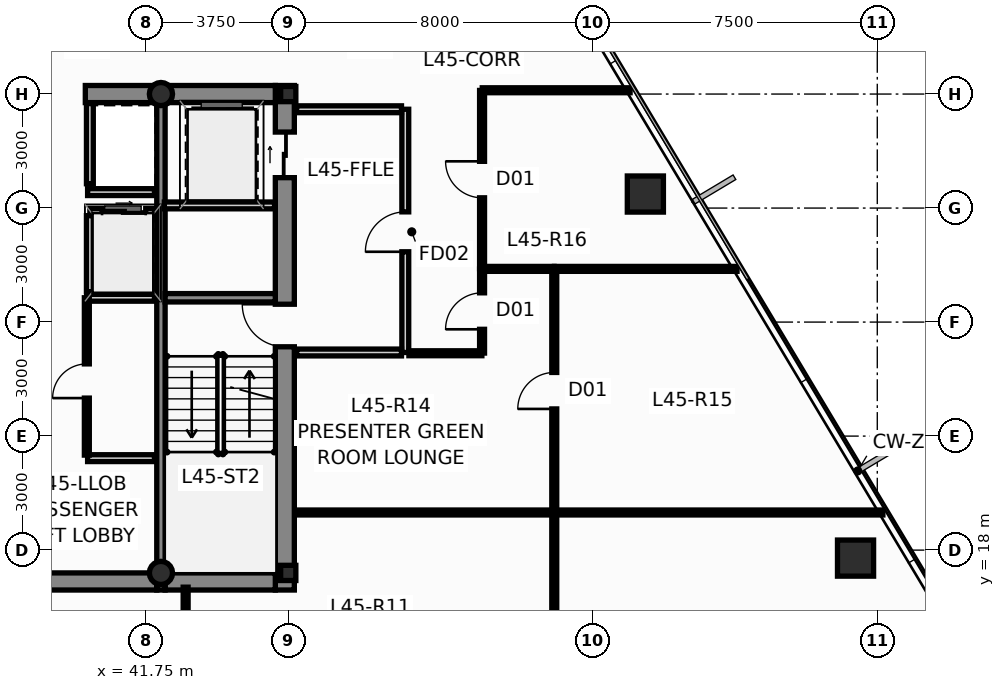
"""IFC4 building model, lengths in metres.
Left out: names, types, materials, properties, quantities, classifications, styles, units other than length and angle.
Written with IfcOpenShell. Run it as: python <this file> out.ifc"""

import sys

from ifc_helpers import new_model, si_unit, direction, frame, frame_2d, origin, origin_2d, place, context, subcontext, project, spatial, rectangle, hollow_rectangle, hollow_circle, i_section, extrude, source, transform, mapped, element, fill, save


model = new_model("IFC4")
c1 = context("Model", 3, precision=1e-05, world=origin(), true_north=direction((0.0, 1.0)))
c2 = subcontext(c1, "Body", "Model", "MODEL_VIEW")
j1 = project(units=[si_unit("LENGTHUNIT", "METRE"), si_unit("PLANEANGLEUNIT", "RADIAN")], contexts=[c1])
p1 = place(None, origin())
s1 = spatial("IfcSite", under=j1, at=p1, CompositionType="ELEMENT")
p2 = place(p1, origin())
s2 = spatial("IfcBuilding", under=s1, at=p2, CompositionType="ELEMENT")
p3 = place(p2, frame((0.0, 0.0, 173.1)))
s3 = spatial("IfcBuildingStorey", under=s2, at=p3, CompositionType="ELEMENT", Elevation=173.1)
m1 = source(origin(), c2, "Body", "SweptSolid", [
    extrude(i_section(OverallWidth=0.4, OverallDepth=0.4, WebThickness=0.02, FlangeThickness=0.032, at=origin_2d()), origin(), (0.0, 0.0, 1.0), 3.65),
])
for number, where, z_axis, x_axis in (
    (1, (45.5, 17.4, 0.0), (0.0, 0.0, 1.0), (1.0, 0.0, 0.0)),
    (2, (45.5, 30.0, 0.0), (0.0, 0.0, 1.0), (1.0, 0.0, 0.0)),
):
    element("IfcColumn", number, at=place(p3, frame(where, z_axis=z_axis, x_axis=x_axis)), inside=s3, PredefinedType="COLUMN", context=c2, shape_type="MappedRepresentation", body=[
        mapped(m1, transform((0.0, 0.0, 0.0), scale=1.0)),
    ])
m2 = source(origin(), c2, "Body", "SweptSolid", [
    extrude(hollow_circle(Radius=0.305, WallThickness=0.025, at=origin_2d()), origin(), (0.0, 0.0, 1.0), 3.65),
])
for number, where, z_axis, x_axis in (
    (3, (42.15, 17.4, 0.0), (0.0, 0.0, 1.0), (1.0, 0.0, 0.0)),
    (4, (42.15, 30.0, 0.0), (0.0, 0.0, 1.0), (1.0, 0.0, 0.0)),
):
    element("IfcColumn", number, at=place(p3, frame(where, z_axis=z_axis, x_axis=x_axis)), inside=s3, PredefinedType="COLUMN", context=c2, shape_type="MappedRepresentation", body=[
        mapped(m2, transform((0.0, 0.0, 0.0), scale=1.0)),
    ])
p4 = place(p3, frame((45.41, 16.95, 0.0), z_axis=(0.0, 0.0, 1.0), x_axis=(0.0, 1.0, 0.0)))
e5 = element("IfcWall", 5, at=p4, inside=s3, PredefinedType="SHEAR", context=c2, shape_type="SweptSolid", body=[
    extrude(rectangle(XDim=13.275, YDim=0.5, at=frame_2d((6.638, 0.0))), origin(), (0.0, 0.0, 1.0), 3.65),
])
p5 = place(p4, frame((6.4, 0.0, 0.0)))
e6 = element("IfcOpeningElement", 6, at=p5, cuts=e5, PredefinedType="OPENING", context=c2, shape_type="SweptSolid", body=[
    extrude(rectangle(XDim=1.12, YDim=2.15, at=frame_2d((0.56, 1.075))), frame((0.0, 0.262, 0.0), z_axis=(0.0, -1.0, 0.0), x_axis=(1.0, 0.0, 0.0)), (0.0, 0.0, 1.0), 0.524),
])
p6 = place(p4, frame((10.85, 0.0, 0.0)))
e7 = element("IfcOpeningElement", 7, at=p6, cuts=e5, PredefinedType="OPENING", context=c2, shape_type="SweptSolid", body=[
    extrude(rectangle(XDim=1.2, YDim=2.2, at=frame_2d((0.6, 1.1))), frame((0.0, 0.262, 0.0), z_axis=(0.0, -1.0, 0.0), x_axis=(1.0, 0.0, 0.0)), (0.0, 0.0, 1.0), 0.524),
])
p7 = place(p3, frame((33.96, 17.175, 0.0), z_axis=(0.0, 0.0, 1.0), x_axis=(1.0, 0.0, 0.0)))
e8 = element("IfcWall", 8, at=p7, inside=s3, PredefinedType="SHEAR", context=c2, shape_type="SweptSolid", body=[
    extrude(rectangle(XDim=8.08, YDim=0.45, at=frame_2d((4.04, 0.0))), origin(), (0.0, 0.0, 1.0), 3.65),
])
p8 = place(p3, frame((42.26, 17.175, 0.0), z_axis=(0.0, 0.0, 1.0), x_axis=(1.0, 0.0, 0.0)))
e9 = element("IfcWall", 9, at=p8, inside=s3, PredefinedType="SHEAR", context=c2, shape_type="SweptSolid", body=[
    extrude(rectangle(XDim=2.9, YDim=0.45, at=frame_2d((1.45, 0.0))), origin(), (0.0, 0.0, 1.0), 3.65),
])
p9 = place(p3, frame((40.16, 30.0, 0.0), z_axis=(0.0, 0.0, 1.0), x_axis=(1.0, 0.0, 0.0)))
e10 = element("IfcWall", 10, at=p9, inside=s3, PredefinedType="SHEAR", context=c2, shape_type="SweptSolid", body=[
    extrude(rectangle(XDim=1.88, YDim=0.45, at=frame_2d((0.94, 0.0))), origin(), (0.0, 0.0, 1.0), 3.65),
])
p10 = place(p3, frame((42.26, 30.0, 0.0), z_axis=(0.0, 0.0, 1.0), x_axis=(1.0, 0.0, 0.0)))
e11 = element("IfcWall", 11, at=p10, inside=s3, PredefinedType="SHEAR", context=c2, shape_type="SweptSolid", body=[
    extrude(rectangle(XDim=2.9, YDim=0.45, at=frame_2d((1.45, 0.0))), origin(), (0.0, 0.0, 1.0), 3.65),
])
p11 = place(p3, frame((42.15, 16.95, 0.0), z_axis=(0.0, 0.0, 1.0), x_axis=(0.0, 1.0, 0.0)))
e12 = element("IfcWall", 12, at=p11, inside=s3, PredefinedType="SHEAR", context=c2, shape_type="SweptSolid", body=[
    extrude(rectangle(XDim=13.275, YDim=0.22, at=frame_2d((6.638, 0.0))), origin(), (0.0, 0.0, 1.0), 3.65),
])
p12 = place(p3, frame((42.26, 24.64, 0.0), z_axis=(0.0, 0.0, 1.0), x_axis=(1.0, 0.0, 0.0)))
e13 = element("IfcWall", 13, at=p12, inside=s3, PredefinedType="SHEAR", context=c2, shape_type="SweptSolid", body=[
    extrude(rectangle(XDim=2.9, YDim=0.22, at=frame_2d((1.45, 0.0))), origin(), (0.0, 0.0, 1.0), 3.65),
])
m3 = source(origin(), c2, "Body", "SweptSolid", [
    extrude(hollow_rectangle(XDim=0.95, YDim=0.95, WallThickness=0.05, at=origin_2d()), origin(), (0.0, 0.0, 1.0), 3.651),
])
p13 = place(p3, frame((60.428, 17.79, 0.0), z_axis=(-0.010364917199, -0.021599150033, 0.999712981415), x_axis=(0.901566609123, -0.432640323264, 0.0)))
e14 = element("IfcColumn", 14, at=p13, inside=s3, PredefinedType="COLUMN", context=c2, shape_type="MappedRepresentation", body=[
    mapped(m3, transform((0.0, 0.0, 0.0), scale=1.0)),
])
m4 = source(origin(), c2, "Body", "SweptSolid", [
    extrude(hollow_rectangle(XDim=0.95, YDim=0.95, WallThickness=0.05, at=origin_2d()), origin(), (0.0, 0.0, 1.0), 3.651),
])
p14 = place(p3, frame((54.897, 27.369, 0.0), z_axis=(-0.014913313399, -0.013776424037, 0.999793880369), x_axis=(0.678553674548, -0.734550822447, 0.0)))
e15 = element("IfcColumn", 15, at=p14, inside=s3, PredefinedType="COLUMN", context=c2, shape_type="MappedRepresentation", body=[
    mapped(m4, transform((0.0, 0.0, 0.0), scale=1.0)),
])
p15 = place(p3, frame((40.28, 26.9, 0.0), z_axis=(0.0, 0.0, 1.0), x_axis=(1.0, 0.0, 0.0)))
e16 = element("IfcWall", 16, at=p15, inside=s3, PredefinedType="PARTITIONING", context=c2, shape_type="SweptSolid", body=[
    extrude(rectangle(XDim=1.7, YDim=0.18, at=frame_2d((0.85, 0.0))), origin(), (0.0, 0.0, 1.0), 3.4),
])
p16 = place(p15, frame((0.32, 0.0, 0.0)))
e17 = element("IfcOpeningElement", 17, at=p16, cuts=e16, PredefinedType="OPENING", context=c2, shape_type="SweptSolid", body=[
    extrude(rectangle(XDim=1.15, YDim=2.2, at=frame_2d((0.575, 1.1))), frame((0.0, 0.102, 0.0), z_axis=(0.0, -1.0, 0.0), x_axis=(1.0, 0.0, 0.0)), (0.0, 0.0, 1.0), 0.204),
])
p17 = place(p3, frame((40.28, 24.8, 0.0), z_axis=(0.0, 0.0, 1.0), x_axis=(0.0, 1.0, 0.0)))
e18 = element("IfcWall", 18, at=p17, inside=s3, PredefinedType="PARTITIONING", context=c2, shape_type="SweptSolid", body=[
    extrude(rectangle(XDim=2.0, YDim=0.18, at=frame_2d((1.0, 0.0))), origin(), (0.0, 0.0, 1.0), 3.4),
])
p18 = place(p3, frame((40.2, 24.64, 0.0), z_axis=(0.0, 0.0, 1.0), x_axis=(1.0, 0.0, 0.0)))
e19 = element("IfcWall", 19, at=p18, inside=s3, PredefinedType="PARTITIONING", context=c2, shape_type="SweptSolid", body=[
    extrude(rectangle(XDim=1.78, YDim=0.18, at=frame_2d((0.89, 0.0))), origin(), (0.0, 0.0, 1.0), 3.4),
])
p19 = place(p3, frame((40.22, 27.42, 0.0), z_axis=(0.0, 0.0, 1.0), x_axis=(1.0, 0.0, 0.0)))
e20 = element("IfcWall", 20, at=p19, inside=s3, PredefinedType="PARTITIONING", context=c2, shape_type="SweptSolid", body=[
    extrude(rectangle(XDim=1.76, YDim=0.18, at=frame_2d((0.88, 0.0))), origin(), (0.0, 0.0, 1.0), 3.4),
])
p20 = place(p3, frame((40.28, 27.64, 0.0), z_axis=(0.0, 0.0, 1.0), x_axis=(0.0, 1.0, 0.0)))
e21 = element("IfcWall", 21, at=p20, inside=s3, PredefinedType="PARTITIONING", context=c2, shape_type="SweptSolid", body=[
    extrude(rectangle(XDim=2.11, YDim=0.18, at=frame_2d((1.055, 0.0))), origin(), (0.0, 0.0, 1.0), 3.4),
])
p21 = place(p3, frame((48.58, 23.2, 0.0), z_axis=(0.0, 0.0, 1.0), x_axis=(0.0, 1.0, 0.0)))
e22 = element("IfcWall", 22, at=p21, inside=s3, PredefinedType="PARTITIONING", context=c2, shape_type="SweptSolid", body=[
    extrude(rectangle(XDim=6.4, YDim=0.18, at=frame_2d((3.2, 0.0))), origin(), (0.0, 0.0, 1.0), 3.078),
])
p22 = place(p21, frame((2.65, 0.0, 0.0)))
e23 = element("IfcOpeningElement", 23, at=p22, cuts=e22, PredefinedType="OPENING", context=c2, shape_type="SweptSolid", body=[
    extrude(rectangle(XDim=1.05, YDim=2.15, at=frame_2d((0.525, 1.075))), frame((0.0, 0.102, 0.0), z_axis=(0.0, -1.0, 0.0), x_axis=(1.0, 0.0, 0.0)), (0.0, 0.0, 1.0), 0.204),
])
p23 = place(p3, frame((45.72, 23.2, 0.0), z_axis=(0.0, 0.0, 1.0), x_axis=(1.0, 0.0, 0.0)))
e24 = element("IfcWall", 24, at=p23, inside=s3, PredefinedType="PARTITIONING", context=c2, shape_type="SweptSolid", body=[
    extrude(rectangle(XDim=2.76, YDim=0.18, at=frame_2d((1.38, 0.0))), origin(), (0.0, 0.0, 1.0), 3.4),
])
p24 = place(p3, frame((45.72, 29.6, 0.0), z_axis=(0.0, 0.0, 1.0), x_axis=(1.0, 0.0, 0.0)))
e25 = element("IfcWall", 25, at=p24, inside=s3, PredefinedType="PARTITIONING", context=c2, shape_type="SweptSolid", body=[
    extrude(rectangle(XDim=2.76, YDim=0.18, at=frame_2d((1.38, 0.0))), origin(), (0.0, 0.0, 1.0), 2.925),
])
p25 = place(p3, frame((42.24, 27.07, 0.0), z_axis=(0.0, 0.0, 1.0), x_axis=(1.0, 0.0, 0.0)))
e26 = element("IfcWall", 26, at=p25, inside=s3, PredefinedType="PARTITIONING", context=c2, shape_type="SweptSolid", body=[
    extrude(rectangle(XDim=2.9, YDim=0.18, at=frame_2d((1.45, 0.0))), origin(), (0.0, 0.0, 1.0), 3.4),
])
p26 = place(p3, frame((40.22, 20.42, 0.0), z_axis=(0.0, 0.0, 1.0), x_axis=(1.0, 0.0, 0.0)))
e27 = element("IfcWall", 27, at=p26, inside=s3, PredefinedType="PARTITIONING", context=c2, shape_type="SweptSolid", body=[
    extrude(rectangle(XDim=1.76, YDim=0.18, at=frame_2d((0.88, 0.0))), origin(), (0.0, 0.0, 1.0), 3.4),
])
p27 = place(p3, frame((40.2, 20.5, 0.0), z_axis=(0.0, 0.0, 1.0), x_axis=(0.0, 1.0, 0.0)))
e28 = element("IfcWall", 28, at=p27, inside=s3, PredefinedType="PARTITIONING", context=c2, shape_type="SweptSolid", body=[
    extrude(rectangle(XDim=4.14, YDim=0.13, at=frame_2d((2.07, 0.0))), origin(), (0.0, 0.0, 1.0), 3.4),
])
p28 = place(p27, frame((1.5, 0.0, 0.0)))
e29 = element("IfcOpeningElement", 29, at=p28, cuts=e28, PredefinedType="OPENING", context=c2, shape_type="SweptSolid", body=[
    extrude(rectangle(XDim=0.9, YDim=2.1, at=frame_2d((0.45, 1.05))), frame((0.0, 0.077, 0.0), z_axis=(0.0, -1.0, 0.0), x_axis=(1.0, 0.0, 0.0)), (0.0, 0.0, 1.0), 0.154),
])
p29 = place(p3, frame((52.505, 18.99, 0.0), z_axis=(0.0, 0.0, 1.0), x_axis=(1.0, 0.0, 0.0)))
e30 = element("IfcWall", 30, at=p29, inside=s3, PredefinedType="PARTITIONING", context=c2, shape_type="SweptSolid", body=[
    extrude(rectangle(XDim=8.643, YDim=0.13, at=frame_2d((4.321, 0.0))), origin(), (0.0, 0.0, 1.0), 3.4),
])
p30 = place(p3, frame((45.675, 18.99, 0.0), z_axis=(0.0, 0.0, 1.0), x_axis=(1.0, 0.0, 0.0)))
e31 = element("IfcWall", 31, at=p30, inside=s3, PredefinedType="PARTITIONING", context=c2, shape_type="SweptSolid", body=[
    extrude(rectangle(XDim=6.82, YDim=0.13, at=frame_2d((3.41, 0.0))), origin(), (0.0, 0.0, 1.0), 3.4),
])
p31 = place(p3, frame((52.5, 18.995, 0.0), z_axis=(0.0, 0.0, 1.0), x_axis=(0.0, 1.0, 0.0)))
e32 = element("IfcWall", 32, at=p31, inside=s3, PredefinedType="PARTITIONING", context=c2, shape_type="SweptSolid", body=[
    extrude(rectangle(XDim=6.4, YDim=0.13, at=frame_2d((3.2, 0.0))), origin(), (0.0, 0.0, 1.0), 3.078),
])
p32 = place(p31, frame((2.72, 0.0, 0.0)))
e33 = element("IfcOpeningElement", 33, at=p32, cuts=e32, PredefinedType="OPENING", context=c2, shape_type="SweptSolid", body=[
    extrude(rectangle(XDim=0.96, YDim=2.15, at=frame_2d((0.48, 1.075))), frame((0.0, 0.077, 0.0), z_axis=(0.0, -1.0, 0.0), x_axis=(1.0, 0.0, 0.0)), (0.0, 0.0, 1.0), 0.154),
])
p33 = place(p3, frame((52.5, 12.595, 0.0), z_axis=(0.0, 0.0, 1.0), x_axis=(0.0, 1.0, 0.0)))
e34 = element("IfcWall", 34, at=p33, inside=s3, PredefinedType="PARTITIONING", context=c2, shape_type="SweptSolid", body=[
    extrude(rectangle(XDim=6.39, YDim=0.13, at=frame_2d((3.195, 0.0))), origin(), (0.0, 0.0, 1.0), 3.4),
])
p34 = place(p33, frame((2.715, 0.0, 0.0)))
e35 = element("IfcOpeningElement", 35, at=p34, cuts=e34, PredefinedType="OPENING", context=c2, shape_type="SweptSolid", body=[
    extrude(rectangle(XDim=0.96, YDim=2.15, at=frame_2d((0.48, 1.075))), frame((0.0, 0.077, 0.0), z_axis=(0.0, -1.0, 0.0), x_axis=(1.0, 0.0, 0.0)), (0.0, 0.0, 1.0), 0.154),
])
p35 = place(p3, frame((52.505, 25.4, 0.0), z_axis=(0.0, 0.0, 1.0), x_axis=(1.0, 0.0, 0.0)))
e36 = element("IfcWall", 36, at=p35, inside=s3, PredefinedType="PARTITIONING", context=c2, shape_type="SweptSolid", body=[
    extrude(rectangle(XDim=4.804, YDim=0.13, at=frame_2d((2.402, 0.0))), origin(), (0.0, 0.0, 1.0), 3.4),
])
p36 = place(p3, frame((50.6, 25.405, 0.0), z_axis=(0.0, 0.0, 1.0), x_axis=(0.0, 1.0, 0.0)))
e37 = element("IfcWall", 37, at=p36, inside=s3, PredefinedType="PARTITIONING", context=c2, shape_type="SweptSolid", body=[
    extrude(rectangle(XDim=4.69, YDim=0.13, at=frame_2d((2.345, 0.0))), origin(), (0.0, 0.0, 1.0), 3.078),
])
p37 = place(p36, frame((1.865, 0.0, 0.0)))
e38 = element("IfcOpeningElement", 38, at=p37, cuts=e37, PredefinedType="OPENING", context=c2, shape_type="SweptSolid", body=[
    extrude(rectangle(XDim=0.96, YDim=2.15, at=frame_2d((0.48, 1.075))), frame((0.0, 0.077, 0.0), z_axis=(0.0, -1.0, 0.0), x_axis=(1.0, 0.0, 0.0)), (0.0, 0.0, 1.0), 0.154),
])
p38 = place(p3, frame((42.8, 12.595, 0.0), z_axis=(0.0, 0.0, 1.0), x_axis=(0.0, 1.0, 0.0)))
e39 = element("IfcWall", 39, at=p38, inside=s3, PredefinedType="PARTITIONING", context=c2, shape_type="SweptSolid", body=[
    extrude(rectangle(XDim=4.43, YDim=0.13, at=frame_2d((2.215, 0.0))), origin(), (0.0, 0.0, 1.0), 3.4),
])
p39 = place(p3, frame((50.605, 30.1, 0.0), z_axis=(0.0, 0.0, 1.0), x_axis=(1.0, 0.0, 0.0)))
e40 = element("IfcWall", 40, at=p39, inside=s3, PredefinedType="PARTITIONING", context=c2, shape_type="SweptSolid", body=[
    extrude(rectangle(XDim=3.89, YDim=0.13, at=frame_2d((1.945, 0.0))), origin(), (0.0, 0.0, 1.0), 3.4),
])
p40 = place(p3, frame((50.6, 23.185, 0.0), z_axis=(0.0, 0.0, 1.0), x_axis=(0.0, 1.0, 0.0)))
e41 = element("IfcWall", 41, at=p40, inside=s3, PredefinedType="PARTITIONING", context=c2, shape_type="SweptSolid", body=[
    extrude(rectangle(XDim=2.21, YDim=0.13, at=frame_2d((1.105, 0.0))), origin(), (0.0, 0.0, 1.0), 3.078),
])
p41 = place(p40, frame((0.625, 0.0, 0.0)))
e42 = element("IfcOpeningElement", 42, at=p41, cuts=e41, PredefinedType="OPENING", context=c2, shape_type="SweptSolid", body=[
    extrude(rectangle(XDim=0.96, YDim=2.15, at=frame_2d((0.48, 1.075))), frame((0.0, 0.077, 0.0), z_axis=(0.0, -1.0, 0.0), x_axis=(1.0, 0.0, 0.0)), (0.0, 0.0, 1.0), 0.154),
])
p42 = place(p3, frame((48.675, 23.18, 0.0), z_axis=(0.0, 0.0, 1.0), x_axis=(1.0, 0.0, 0.0)))
e43 = element("IfcWall", 43, at=p42, inside=s3, PredefinedType="PARTITIONING", context=c2, shape_type="SweptSolid", body=[
    extrude(rectangle(XDim=1.92, YDim=0.13, at=frame_2d((0.96, 0.0))), origin(), (0.0, 0.0, 1.0), 3.4),
])
p43 = place(p3, frame((50.605, 25.4, 0.0), z_axis=(0.0, 0.0, 1.0), x_axis=(1.0, 0.0, 0.0)))
e44 = element("IfcWall", 44, at=p43, inside=s3, PredefinedType="PARTITIONING", context=c2, shape_type="SweptSolid", body=[
    extrude(rectangle(XDim=1.89, YDim=0.13, at=frame_2d((0.945, 0.0))), origin(), (0.0, 0.0, 1.0), 3.4),
])
p44 = place(p5, origin())
e45 = element("IfcDoor", 45, at=p44, inside=s3, OperationType="SINGLE_SWING_RIGHT", PredefinedType="DOOR", context=c2, shape_type="SweptSolid", body=[
    extrude(rectangle(XDim=1.12, YDim=2.15, at=frame_2d((0.56, 1.075))), frame((0.0, 0.025, 0.0), z_axis=(0.0, -1.0, 0.0), x_axis=(1.0, 0.0, 0.0)), (0.0, 0.0, 1.0), 0.05),
])
fill(e6, e45)
p45 = place(p6, origin())
e46 = element("IfcDoor", 46, at=p45, inside=s3, OperationType="SLIDING_TO_RIGHT", PredefinedType="DOOR", context=c2, shape_type="SweptSolid", body=[
    extrude(rectangle(XDim=1.2, YDim=2.2, at=frame_2d((0.6, 1.1))), frame((0.0, 0.025, 0.0), z_axis=(0.0, -1.0, 0.0), x_axis=(1.0, 0.0, 0.0)), (0.0, 0.0, 1.0), 0.05),
])
fill(e7, e46)
p46 = place(p16, origin())
e47 = element("IfcDoor", 47, at=p46, inside=s3, OperationType="SLIDING_TO_LEFT", PredefinedType="DOOR", context=c2, shape_type="SweptSolid", body=[
    extrude(rectangle(XDim=1.15, YDim=2.2, at=frame_2d((0.575, 1.1))), frame((0.0, 0.025, 0.0), z_axis=(0.0, -1.0, 0.0), x_axis=(1.0, 0.0, 0.0)), (0.0, 0.0, 1.0), 0.05),
])
fill(e17, e47)
p47 = place(p22, origin())
e48 = element("IfcDoor", 48, at=p47, inside=s3, OperationType="SINGLE_SWING_LEFT", PredefinedType="DOOR", context=c2, shape_type="SweptSolid", body=[
    extrude(rectangle(XDim=1.05, YDim=2.15, at=frame_2d((0.525, 1.075))), frame((0.0, 0.025, 0.0), z_axis=(0.0, -1.0, 0.0), x_axis=(1.0, 0.0, 0.0)), (0.0, 0.0, 1.0), 0.05),
])
fill(e23, e48)
p48 = place(p28, origin())
e49 = element("IfcDoor", 49, at=p48, inside=s3, OperationType="SINGLE_SWING_LEFT", PredefinedType="DOOR", context=c2, shape_type="SweptSolid", body=[
    extrude(rectangle(XDim=0.9, YDim=2.1, at=frame_2d((0.45, 1.05))), frame((0.0, 0.025, 0.0), z_axis=(0.0, -1.0, 0.0), x_axis=(1.0, 0.0, 0.0)), (0.0, 0.0, 1.0), 0.05),
])
fill(e29, e49)
p49 = place(p32, origin())
e50 = element("IfcDoor", 50, at=p49, inside=s3, OperationType="SINGLE_SWING_LEFT", PredefinedType="DOOR", context=c2, shape_type="SweptSolid", body=[
    extrude(rectangle(XDim=0.96, YDim=2.15, at=frame_2d((0.48, 1.075))), frame((0.0, 0.025, 0.0), z_axis=(0.0, -1.0, 0.0), x_axis=(1.0, 0.0, 0.0)), (0.0, 0.0, 1.0), 0.05),
])
fill(e33, e50)
p50 = place(p37, origin())
e51 = element("IfcDoor", 51, at=p50, inside=s3, OperationType="SINGLE_SWING_RIGHT", PredefinedType="DOOR", context=c2, shape_type="SweptSolid", body=[
    extrude(rectangle(XDim=0.96, YDim=2.15, at=frame_2d((0.48, 1.075))), frame((0.0, 0.025, 0.0), z_axis=(0.0, -1.0, 0.0), x_axis=(1.0, 0.0, 0.0)), (0.0, 0.0, 1.0), 0.05),
])
fill(e38, e51)
p51 = place(p41, origin())
e52 = element("IfcDoor", 52, at=p51, inside=s3, OperationType="SINGLE_SWING_LEFT", PredefinedType="DOOR", context=c2, shape_type="SweptSolid", body=[
    extrude(rectangle(XDim=0.96, YDim=2.15, at=frame_2d((0.48, 1.075))), frame((0.0, 0.025, 0.0), z_axis=(0.0, -1.0, 0.0), x_axis=(1.0, 0.0, 0.0)), (0.0, 0.0, 1.0), 0.05),
])
fill(e42, e52)
save(model, sys.argv[1])
